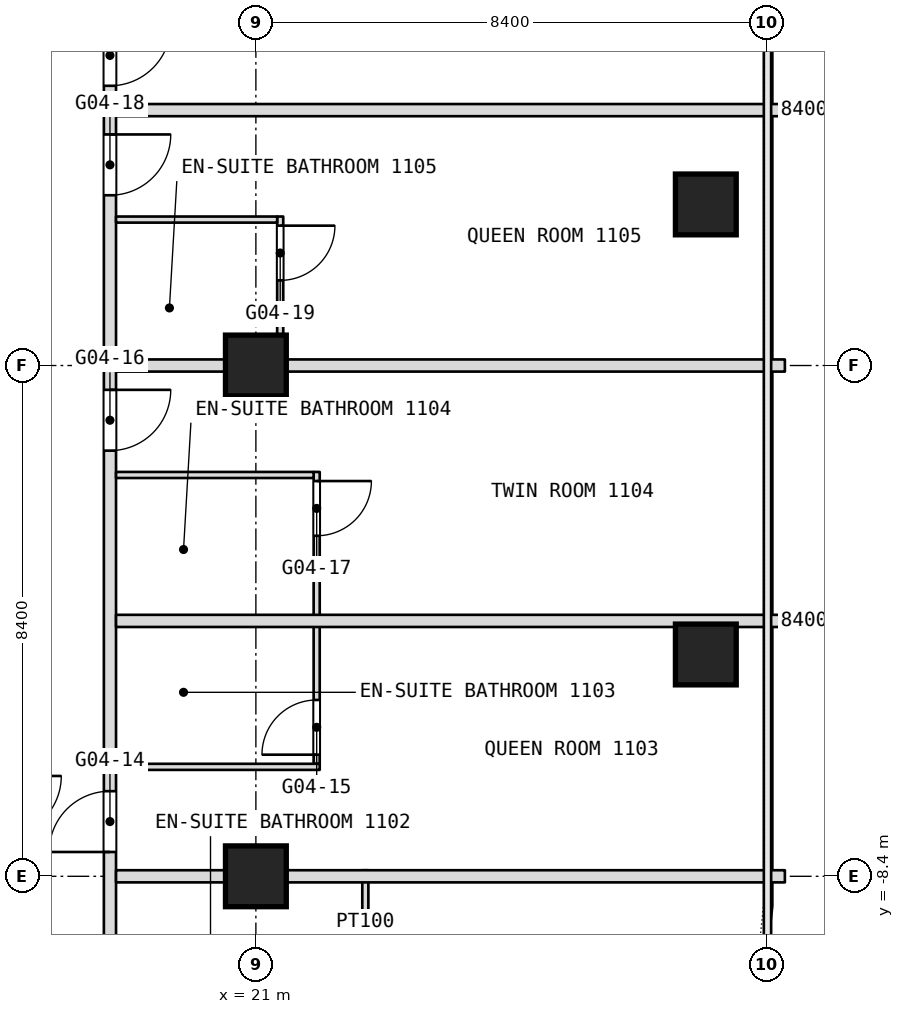
"""IFC4 building model, lengths in metres.
Left out: names, types, materials, properties, quantities, classifications, styles, units other than length and angle.
Written with IfcOpenShell. Run it as: python <this file> out.ifc"""

import sys

from ifc_helpers import new_model, si_unit, direction, frame, frame_2d, origin, origin_2d, place, context, subcontext, project, spatial, rectangle, extrude, element, fill, save


model = new_model("IFC4")
c1 = context("Model", 3, precision=1e-05, world=origin(), true_north=direction((0.0, 1.0)))
c2 = subcontext(c1, "Body", "Model", "MODEL_VIEW")
j1 = project(units=[si_unit("LENGTHUNIT", "METRE"), si_unit("PLANEANGLEUNIT", "RADIAN")], contexts=[c1])
p1 = place(None, origin())
s1 = spatial("IfcSite", under=j1, at=p1, CompositionType="ELEMENT")
p2 = place(p1, origin())
s2 = spatial("IfcBuilding", under=s1, at=p2, CompositionType="ELEMENT")
p3 = place(p2, frame((0.0, 0.0, 54.5)))
s3 = spatial("IfcBuildingStorey", under=s2, at=p3, CompositionType="ELEMENT", Elevation=54.5)
for number, where, z_axis, x_axis in (
    (1, (21.0, -8.4, 0.0), (0.0, 0.0, 1.0), (1.0, 0.0, 0.0)),
    (2, (21.0, 0.0, 0.0), (0.0, 0.0, 1.0), (1.0, 0.0, 0.0)),
    (3, (28.4, 2.649, 0.0), (0.0, 0.0, 1.0), (1.0, 0.0, 0.0)),
    (4, (28.4, -4.752, 0.0), (0.0, 0.0, 1.0), (1.0, 0.0, 0.0)),
):
    element("IfcColumn", number, at=place(p3, frame(where, z_axis=z_axis, x_axis=x_axis)), inside=s3, PredefinedType="COLUMN", context=c2, shape_type="SweptSolid", body=[
        extrude(rectangle(XDim=1.0, YDim=1.0, at=origin_2d()), origin(), (0.0, 0.0, 1.0), 3.6),
    ])
p4 = place(p3, frame((22.8, -10.75, 0.0), z_axis=(0.0, 0.0, 1.0), x_axis=(0.0, 1.0, 0.0)))
e5 = element("IfcWall", 5, at=p4, inside=s3, PredefinedType="PARTITIONING", context=c2, shape_type="SweptSolid", body=[
    extrude(rectangle(XDim=2.45, YDim=0.1, at=frame_2d((1.225, 0.0))), origin(), (0.0, 0.0, 1.0), 3.34),
])
p5 = place(p4, frame((0.15, 0.0, 0.0)))
e6 = element("IfcOpeningElement", 6, at=p5, cuts=e5, PredefinedType="OPENING", context=c2, shape_type="SweptSolid", body=[
    extrude(rectangle(XDim=0.9, YDim=2.1, at=frame_2d((0.45, 1.05))), frame((0.0, 0.05, 0.0), z_axis=(0.0, -1.0, 0.0), x_axis=(1.0, 0.0, 0.0)), (0.0, 0.0, 1.0), 0.1),
])
p6 = place(p3, frame((22.0, -6.55, 0.0), z_axis=(0.0, 0.0, 1.0), x_axis=(0.0, 1.0, 0.0)))
e7 = element("IfcWall", 7, at=p6, inside=s3, PredefinedType="PARTITIONING", context=c2, shape_type="SweptSolid", body=[
    extrude(rectangle(XDim=4.8, YDim=0.1, at=frame_2d((2.4, 0.0))), origin(), (0.0, 0.0, 1.0), 3.34),
])
p7 = place(p6, frame((0.15, 0.0, 0.0)))
e8 = element("IfcOpeningElement", 8, at=p7, cuts=e7, PredefinedType="OPENING", context=c2, shape_type="SweptSolid", body=[
    extrude(rectangle(XDim=0.9, YDim=2.1, at=frame_2d((0.45, 1.05))), frame((0.0, 0.05, 0.0), z_axis=(0.0, -1.0, 0.0), x_axis=(1.0, 0.0, 0.0)), (0.0, 0.0, 1.0), 0.1),
])
p8 = place(p6, frame((3.75, 0.0, 0.0)))
e9 = element("IfcOpeningElement", 9, at=p8, cuts=e7, PredefinedType="OPENING", context=c2, shape_type="SweptSolid", body=[
    extrude(rectangle(XDim=0.9, YDim=2.1, at=frame_2d((0.45, 1.05))), frame((0.0, 0.05, 0.0), z_axis=(0.0, -1.0, 0.0), x_axis=(1.0, 0.0, 0.0)), (0.0, 0.0, 1.0), 0.1),
])
p9 = place(p3, frame((21.4, 0.1, 0.0), z_axis=(0.0, 0.0, 1.0), x_axis=(0.0, 1.0, 0.0)))
e10 = element("IfcWall", 10, at=p9, inside=s3, PredefinedType="PARTITIONING", context=c2, shape_type="SweptSolid", body=[
    extrude(rectangle(XDim=2.35, YDim=0.1, at=frame_2d((1.175, 0.0))), origin(), (0.0, 0.0, 1.0), 3.34),
])
p10 = place(p9, frame((1.3, 0.0, 0.0)))
e11 = element("IfcOpeningElement", 11, at=p10, cuts=e10, PredefinedType="OPENING", context=c2, shape_type="SweptSolid", body=[
    extrude(rectangle(XDim=0.9, YDim=2.1, at=frame_2d((0.45, 1.05))), frame((0.0, 0.05, 0.0), z_axis=(0.0, -1.0, 0.0), x_axis=(1.0, 0.0, 0.0)), (0.0, 0.0, 1.0), 0.1),
])
p11 = place(p3, frame((18.6, -16.665, 0.0), z_axis=(0.0, 0.0, 1.0), x_axis=(0.0, 1.0, 0.0)))
e12 = element("IfcWall", 12, at=p11, inside=s3, PredefinedType="PARTITIONING", context=c2, shape_type="SweptSolid", body=[
    extrude(rectangle(XDim=50.205, YDim=0.2, at=frame_2d((25.103, 0.0))), origin(), (0.0, 0.0, 1.0), 3.34),
])
p12 = place(p11, frame((2.991, 0.0, 0.0)))
e13 = element("IfcOpeningElement", 13, at=p12, cuts=e12, PredefinedType="OPENING", context=c2, shape_type="SweptSolid", body=[
    extrude(rectangle(XDim=1.0, YDim=2.1, at=frame_2d((0.5, 1.05))), frame((0.0, 0.1, 0.0), z_axis=(0.0, -1.0, 0.0), x_axis=(1.0, 0.0, 0.0)), (0.0, 0.0, 1.0), 0.2),
])
p13 = place(p11, frame((4.574, 0.0, 0.0)))
e14 = element("IfcOpeningElement", 14, at=p13, cuts=e12, PredefinedType="OPENING", context=c2, shape_type="SweptSolid", body=[
    extrude(rectangle(XDim=1.0, YDim=2.1, at=frame_2d((0.5, 1.05))), frame((0.0, 0.1, 0.0), z_axis=(0.0, -1.0, 0.0), x_axis=(1.0, 0.0, 0.0)), (0.0, 0.0, 1.0), 0.2),
])
p14 = place(p11, frame((8.665, 0.0, 0.0)))
e15 = element("IfcOpeningElement", 15, at=p14, cuts=e12, PredefinedType="OPENING", context=c2, shape_type="SweptSolid", body=[
    extrude(rectangle(XDim=1.0, YDim=2.1, at=frame_2d((0.5, 1.05))), frame((0.0, 0.1, 0.0), z_axis=(0.0, -1.0, 0.0), x_axis=(1.0, 0.0, 0.0)), (0.0, 0.0, 1.0), 0.2),
])
p15 = place(p11, frame((15.265, 0.0, 0.0)))
e16 = element("IfcOpeningElement", 16, at=p15, cuts=e12, PredefinedType="OPENING", context=c2, shape_type="SweptSolid", body=[
    extrude(rectangle(XDim=1.0, YDim=2.1, at=frame_2d((0.5, 1.05))), frame((0.0, 0.1, 0.0), z_axis=(0.0, -1.0, 0.0), x_axis=(1.0, 0.0, 0.0)), (0.0, 0.0, 1.0), 0.2),
])
p16 = place(p11, frame((19.465, 0.0, 0.0)))
e17 = element("IfcOpeningElement", 17, at=p16, cuts=e12, PredefinedType="OPENING", context=c2, shape_type="SweptSolid", body=[
    extrude(rectangle(XDim=1.0, YDim=2.1, at=frame_2d((0.5, 1.05))), frame((0.0, 0.1, 0.0), z_axis=(0.0, -1.0, 0.0), x_axis=(1.0, 0.0, 0.0)), (0.0, 0.0, 1.0), 0.2),
])
p17 = place(p11, frame((21.265, 0.0, 0.0)))
e18 = element("IfcOpeningElement", 18, at=p17, cuts=e12, PredefinedType="OPENING", context=c2, shape_type="SweptSolid", body=[
    extrude(rectangle(XDim=1.0, YDim=2.1, at=frame_2d((0.5, 1.05))), frame((0.0, 0.1, 0.0), z_axis=(0.0, -1.0, 0.0), x_axis=(1.0, 0.0, 0.0)), (0.0, 0.0, 1.0), 0.2),
])
p18 = place(p11, frame((28.365, 0.0, 0.0)))
e19 = element("IfcOpeningElement", 19, at=p18, cuts=e12, PredefinedType="OPENING", context=c2, shape_type="SweptSolid", body=[
    extrude(rectangle(XDim=1.8, YDim=2.1, at=frame_2d((0.9, 1.05))), frame((0.0, 0.1, 0.0), z_axis=(0.0, -1.0, 0.0), x_axis=(1.0, 0.0, 0.0)), (0.0, 0.0, 1.0), 0.2),
])
p19 = place(p11, frame((37.165, 0.0, 0.0)))
e20 = element("IfcOpeningElement", 20, at=p19, cuts=e12, PredefinedType="OPENING", context=c2, shape_type="SweptSolid", body=[
    extrude(rectangle(XDim=1.1, YDim=2.1, at=frame_2d((0.55, 1.05))), frame((0.0, 0.1, 0.0), z_axis=(0.0, -1.0, 0.0), x_axis=(1.0, 0.0, 0.0)), (0.0, 0.0, 1.0), 0.2),
])
p20 = place(p11, frame((43.415, 0.0, 0.0)))
e21 = element("IfcOpeningElement", 21, at=p20, cuts=e12, PredefinedType="OPENING", context=c2, shape_type="SweptSolid", body=[
    extrude(rectangle(XDim=1.1, YDim=2.1, at=frame_2d((0.55, 1.05))), frame((0.0, 0.1, 0.0), z_axis=(0.0, -1.0, 0.0), x_axis=(1.0, 0.0, 0.0)), (0.0, 0.0, 1.0), 0.2),
])
p21 = place(p3, frame((18.7, -8.4, 0.0), z_axis=(0.0, 0.0, 1.0), x_axis=(1.0, 0.0, 0.0)))
e22 = element("IfcWall", 22, at=p21, inside=s3, PredefinedType="PARTITIONING", context=c2, shape_type="SweptSolid", body=[
    extrude(rectangle(XDim=11.0, YDim=0.2, at=frame_2d((5.5, 0.0))), origin(), (0.0, 0.0, 1.0), 2.84),
])
p22 = place(p3, frame((18.7, -6.6, 0.0), z_axis=(0.0, 0.0, 1.0), x_axis=(1.0, 0.0, 0.0)))
e23 = element("IfcWall", 23, at=p22, inside=s3, PredefinedType="PARTITIONING", context=c2, shape_type="SweptSolid", body=[
    extrude(rectangle(XDim=3.35, YDim=0.1, at=frame_2d((1.675, 0.0))), origin(), (0.0, 0.0, 1.0), 3.34),
])
p23 = place(p3, frame((18.7, -4.2, 0.0), z_axis=(0.0, 0.0, 1.0), x_axis=(1.0, 0.0, 0.0)))
e24 = element("IfcWall", 24, at=p23, inside=s3, PredefinedType="PARTITIONING", context=c2, shape_type="SweptSolid", body=[
    extrude(rectangle(XDim=11.0, YDim=0.2, at=frame_2d((5.5, 0.0))), origin(), (0.0, 0.0, 1.0), 3.34),
])
p24 = place(p3, frame((18.7, -1.8, 0.0), z_axis=(0.0, 0.0, 1.0), x_axis=(1.0, 0.0, 0.0)))
e25 = element("IfcWall", 25, at=p24, inside=s3, PredefinedType="PARTITIONING", context=c2, shape_type="SweptSolid", body=[
    extrude(rectangle(XDim=3.25, YDim=0.1, at=frame_2d((1.625, 0.0))), origin(), (0.0, 0.0, 1.0), 3.34),
])
p25 = place(p3, frame((18.7, 0.0, 0.0), z_axis=(0.0, 0.0, 1.0), x_axis=(1.0, 0.0, 0.0)))
e26 = element("IfcWall", 26, at=p25, inside=s3, PredefinedType="PARTITIONING", context=c2, shape_type="SweptSolid", body=[
    extrude(rectangle(XDim=11.0, YDim=0.2, at=frame_2d((5.5, 0.0))), origin(), (0.0, 0.0, 1.0), 2.84),
])
p26 = place(p3, frame((18.7, 2.4, 0.0), z_axis=(0.0, 0.0, 1.0), x_axis=(1.0, 0.0, 0.0)))
e27 = element("IfcWall", 27, at=p26, inside=s3, PredefinedType="PARTITIONING", context=c2, shape_type="SweptSolid", body=[
    extrude(rectangle(XDim=2.65, YDim=0.1, at=frame_2d((1.325, 0.0))), origin(), (0.0, 0.0, 1.0), 3.34),
])
p27 = place(p3, frame((18.7, 4.2, 0.0), z_axis=(0.0, 0.0, 1.0), x_axis=(1.0, 0.0, 0.0)))
e28 = element("IfcWall", 28, at=p27, inside=s3, PredefinedType="PARTITIONING", context=c2, shape_type="SweptSolid", body=[
    extrude(rectangle(XDim=11.0, YDim=0.2, at=frame_2d((5.5, 0.0))), origin(), (0.0, 0.0, 1.0), 3.34),
])
p28 = place(p7, origin())
e29 = element("IfcDoor", 29, at=p28, inside=s3, OperationType="SINGLE_SWING_LEFT", PredefinedType="DOOR", context=c2, shape_type="SweptSolid", body=[
    extrude(rectangle(XDim=0.9, YDim=2.1, at=frame_2d((0.45, 1.05))), frame((0.0, 0.025, 0.0), z_axis=(0.0, -1.0, 0.0), x_axis=(1.0, 0.0, 0.0)), (0.0, 0.0, 1.0), 0.05),
])
fill(e8, e29)
p29 = place(p8, origin())
e30 = element("IfcDoor", 30, at=p29, inside=s3, OperationType="SINGLE_SWING_RIGHT", PredefinedType="DOOR", context=c2, shape_type="SweptSolid", body=[
    extrude(rectangle(XDim=0.9, YDim=2.1, at=frame_2d((0.45, 1.05))), frame((0.0, 0.025, 0.0), z_axis=(0.0, -1.0, 0.0), x_axis=(1.0, 0.0, 0.0)), (0.0, 0.0, 1.0), 0.05),
])
fill(e9, e30)
p30 = place(p10, origin())
e31 = element("IfcDoor", 31, at=p30, inside=s3, OperationType="SINGLE_SWING_RIGHT", PredefinedType="DOOR", context=c2, shape_type="SweptSolid", body=[
    extrude(rectangle(XDim=0.9, YDim=2.1, at=frame_2d((0.45, 1.05))), frame((0.0, 0.025, 0.0), z_axis=(0.0, -1.0, 0.0), x_axis=(1.0, 0.0, 0.0)), (0.0, 0.0, 1.0), 0.05),
])
fill(e11, e31)
p31 = place(p14, origin())
e32 = element("IfcDoor", 32, at=p31, inside=s3, OperationType="SINGLE_SWING_RIGHT", PredefinedType="DOOR", context=c2, shape_type="SweptSolid", body=[
    extrude(rectangle(XDim=1.0, YDim=2.1, at=frame_2d((0.5, 1.05))), frame((0.0, 0.025, 0.0), z_axis=(0.0, -1.0, 0.0), x_axis=(1.0, 0.0, 0.0)), (0.0, 0.0, 1.0), 0.05),
])
fill(e15, e32)
p32 = place(p15, origin())
e33 = element("IfcDoor", 33, at=p32, inside=s3, OperationType="SINGLE_SWING_RIGHT", PredefinedType="DOOR", context=c2, shape_type="SweptSolid", body=[
    extrude(rectangle(XDim=1.0, YDim=2.1, at=frame_2d((0.5, 1.05))), frame((0.0, 0.025, 0.0), z_axis=(0.0, -1.0, 0.0), x_axis=(1.0, 0.0, 0.0)), (0.0, 0.0, 1.0), 0.05),
])
fill(e16, e33)
p33 = place(p16, origin())
e34 = element("IfcDoor", 34, at=p33, inside=s3, OperationType="SINGLE_SWING_RIGHT", PredefinedType="DOOR", context=c2, shape_type="SweptSolid", body=[
    extrude(rectangle(XDim=1.0, YDim=2.1, at=frame_2d((0.5, 1.05))), frame((0.0, 0.025, 0.0), z_axis=(0.0, -1.0, 0.0), x_axis=(1.0, 0.0, 0.0)), (0.0, 0.0, 1.0), 0.05),
])
fill(e17, e34)
p34 = place(p17, origin())
e35 = element("IfcDoor", 35, at=p34, inside=s3, OperationType="SINGLE_SWING_RIGHT", PredefinedType="DOOR", context=c2, shape_type="SweptSolid", body=[
    extrude(rectangle(XDim=1.0, YDim=2.1, at=frame_2d((0.5, 1.05))), frame((0.0, 0.025, 0.0), z_axis=(0.0, -1.0, 0.0), x_axis=(1.0, 0.0, 0.0)), (0.0, 0.0, 1.0), 0.05),
])
fill(e18, e35)
save(model, sys.argv[1])
